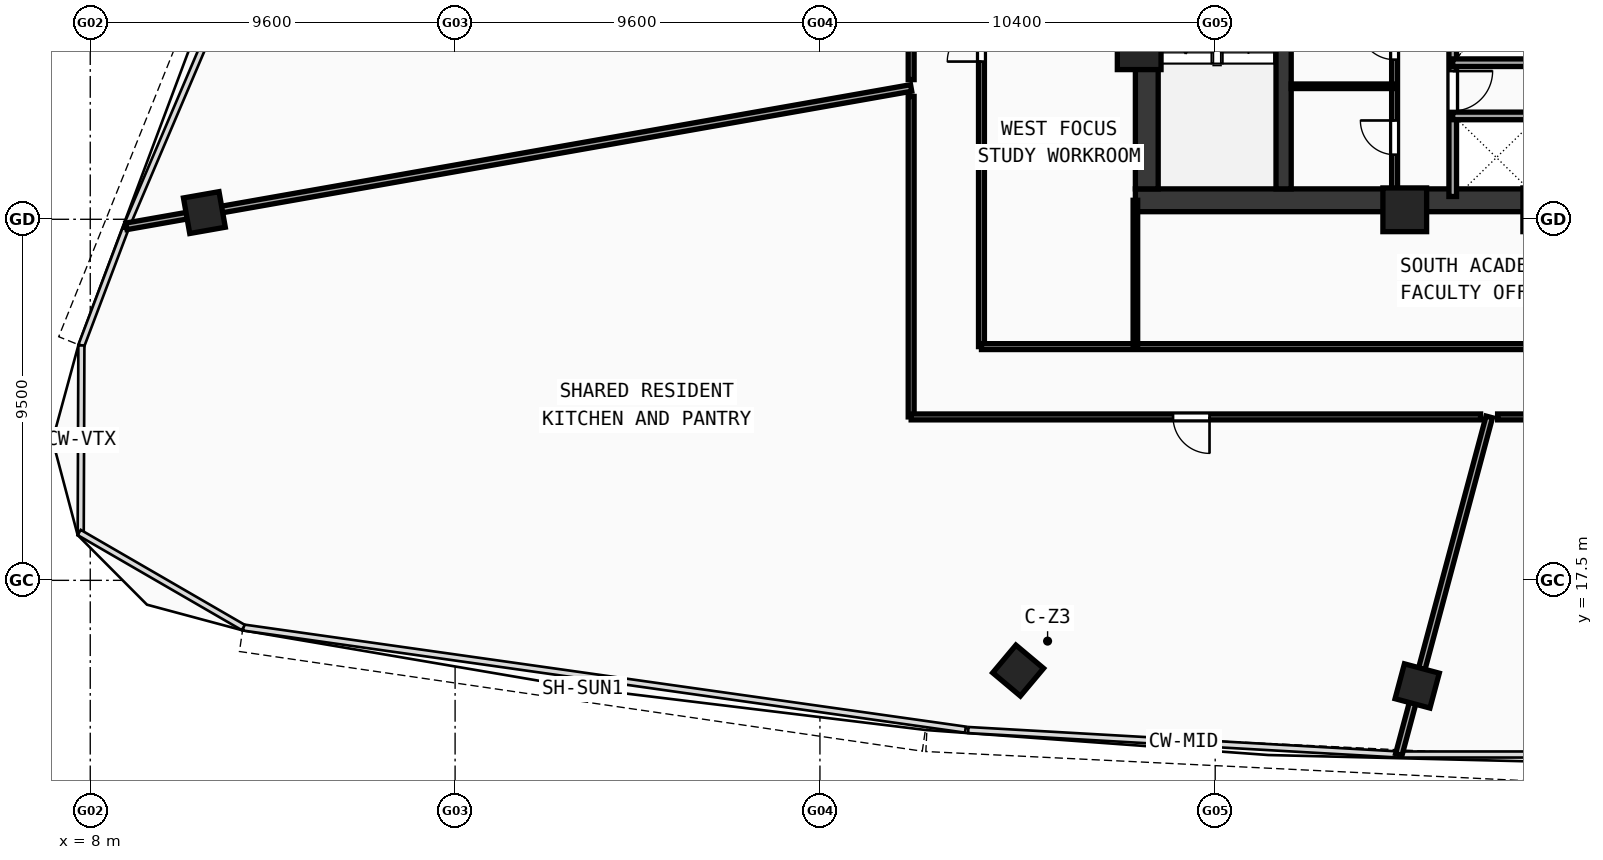
"""IFC4 building model, lengths in metres.
Left out: names, types, materials, properties, quantities, classifications, styles, units other than length and angle.
Written with IfcOpenShell. Run it as: python <this file> out.ifc"""

import sys

from ifc_helpers import new_model, si_unit, direction, frame, frame_2d, origin, origin_with_axes, origin_2d, place, context, subcontext, project, spatial, rectangle, hollow_rectangle, extrude, source, transform, mapped, element, fill, save


model = new_model("IFC4")
c1 = context("Model", 3, precision=1e-05, world=origin(), true_north=direction((0.0, 1.0)))
c2 = subcontext(c1, "Body", "Model", "MODEL_VIEW")
j1 = project(units=[si_unit("LENGTHUNIT", "METRE"), si_unit("PLANEANGLEUNIT", "RADIAN")], contexts=[c1])
p1 = place(None, origin())
s1 = spatial("IfcSite", under=j1, at=p1, CompositionType="ELEMENT")
p2 = place(p1, origin())
s2 = spatial("IfcBuilding", under=s1, at=p2, CompositionType="ELEMENT")
p3 = place(p2, frame((0.0, 0.0, 129.83)))
s3 = spatial("IfcBuildingStorey", under=s2, at=p3, CompositionType="ELEMENT", Elevation=129.83)
p4 = place(p3, frame((35.5, 27.5, 0.0), z_axis=(0.0, 0.0, 1.0), x_axis=(1.0, 0.0, 0.0)))
e1 = element("IfcWall", 1, at=p4, inside=s3, PredefinedType="SHEAR", context=c2, shape_type="SweptSolid", body=[
    extrude(rectangle(XDim=25.0, YDim=0.6, at=frame_2d((12.5, 0.0))), origin(), (0.0, 0.0, 1.0), 3.42),
])
p5 = place(p3, frame((35.8, 27.8, 0.0), z_axis=(0.0, 0.0, 1.0), x_axis=(0.0, 1.0, 0.0)))
e2 = element("IfcWall", 2, at=p5, inside=s3, PredefinedType="SHEAR", context=c2, shape_type="SweptSolid", body=[
    extrude(rectangle(XDim=12.1, YDim=0.6, at=frame_2d((6.05, 0.0))), origin(), (0.0, 0.0, 1.0), 3.42),
])
p6 = place(p3, frame((39.4, 27.8, 0.0), z_axis=(0.0, 0.0, 1.0), x_axis=(0.0, 1.0, 0.0)))
e3 = element("IfcWall", 3, at=p6, inside=s3, PredefinedType="SHEAR", context=c2, shape_type="SweptSolid", body=[
    extrude(rectangle(XDim=12.1, YDim=0.4, at=frame_2d((6.05, 0.0))), origin(), (0.0, 0.0, 1.0), 3.42),
])
p7 = place(p6, frame((9.95, 0.0, 0.0)))
e4 = element("IfcOpeningElement", 4, at=p7, cuts=e3, PredefinedType="OPENING", context=c2, shape_type="SweptSolid", body=[
    extrude(rectangle(XDim=1.1, YDim=2.1, at=frame_2d((0.55, 1.05))), frame((0.0, 0.21, 0.0), z_axis=(0.0, -1.0, 0.0), x_axis=(1.0, 0.0, 0.0)), (0.0, 0.0, 1.0), 0.42),
])
m1 = source(origin(), c2, "Body", "SweptSolid", [
    extrude(hollow_rectangle(XDim=1.15, YDim=1.15, WallThickness=0.048, at=origin_2d()), origin(), (0.0, 0.0, 1.0), 3.68),
])
for number, where, z_axis, x_axis in (
    (5, (42.588, 27.25, -0.26), (0.0, 0.0, 1.0), (1.0, 0.0, 0.0)),
    (6, (46.272, 27.25, -0.26), (0.0, 0.0, 1.0), (1.0, 0.0, 0.0)),
    (7, (35.6, 31.513, -0.26), (0.0, 0.0, 1.0), (1.0, 0.0, 0.0)),
):
    element("IfcColumn", number, at=place(p3, frame(where, z_axis=z_axis, x_axis=x_axis)), inside=s3, PredefinedType="COLUMN", context=c2, shape_type="MappedRepresentation", body=[
        mapped(m1, transform((0.0, 0.0, 0.0), scale=1.0)),
    ])
m2 = source(origin(), c2, "Body", "SweptSolid", [
    extrude(hollow_rectangle(XDim=0.95, YDim=0.95, WallThickness=0.04, at=origin_2d()), origin(), (0.0, 0.0, 1.0), 3.68),
])
for number, where, z_axis, x_axis in (
    (8, (32.415, 15.126, -0.26), (0.0, 0.0, 1.0), (0.766, -0.643, 0.0)),
    (9, (42.915, 14.722, -0.26), (0.0, 0.0, 1.0), (0.966, -0.259, 0.0)),
    (10, (11.003, 27.177, -0.26), (0.0, 0.0, 1.0), (0.174, -0.985, 0.0)),
):
    element("IfcColumn", number, at=place(p3, frame(where, z_axis=z_axis, x_axis=x_axis)), inside=s3, PredefinedType="COLUMN", context=c2, shape_type="MappedRepresentation", body=[
        mapped(m2, transform((0.0, 0.0, 0.0), scale=1.0)),
    ])
p8 = place(p3, frame((43.85, 27.6, 0.0), z_axis=(0.0, 0.0, 1.0), x_axis=(0.0, 1.0, 0.0)))
e11 = element("IfcWall", 11, at=p8, inside=s3, PredefinedType="SOLIDWALL", context=c2, shape_type="SweptSolid", body=[
    extrude(rectangle(XDim=6.22, YDim=0.2, at=frame_2d((3.11, 0.0))), origin(), (0.0, 0.0, 1.0), 3.42),
])
p9 = place(p8, frame((2.25, 0.0, 0.0)))
e12 = element("IfcOpeningElement", 12, at=p9, cuts=e11, PredefinedType="OPENING", context=c2, shape_type="SweptSolid", body=[
    extrude(rectangle(XDim=1.05, YDim=2.1, at=frame_2d((0.525, 1.05))), frame((0.0, 0.11, 0.0), z_axis=(0.0, -1.0, 0.0), x_axis=(1.0, 0.0, 0.0)), (0.0, 0.0, 1.0), 0.22),
])
p10 = place(p3, frame((43.85, 29.72, 0.0), z_axis=(0.0, 0.0, 1.0), x_axis=(1.0, 0.0, 0.0)))
e13 = element("IfcWall", 13, at=p10, inside=s3, PredefinedType="SOLIDWALL", context=c2, shape_type="SweptSolid", body=[
    extrude(rectangle(XDim=7.2, YDim=0.2, at=frame_2d((3.6, 0.0))), origin(), (0.0, 0.0, 1.0), 3.42),
])
p11 = place(p3, frame((43.85, 31.12, 0.0), z_axis=(0.0, 0.0, 1.0), x_axis=(1.0, 0.0, 0.0)))
e14 = element("IfcWall", 14, at=p11, inside=s3, PredefinedType="SOLIDWALL", context=c2, shape_type="SweptSolid", body=[
    extrude(rectangle(XDim=9.83, YDim=0.2, at=frame_2d((4.915, 0.0))), origin(), (0.0, 0.0, 1.0), 3.42),
])
p12 = place(p3, frame((42.32, 27.6, 0.0), z_axis=(0.0, 0.0, 1.0), x_axis=(0.0, 1.0, 0.0)))
e15 = element("IfcWall", 15, at=p12, inside=s3, PredefinedType="PARTITIONING", context=c2, shape_type="SweptSolid", body=[
    extrude(rectangle(XDim=5.9, YDim=0.155, at=frame_2d((2.95, 0.0))), origin(), (0.0, 0.0, 1.0), 3.42),
])
p13 = place(p12, frame((1.1, 0.0, 0.0)))
e16 = element("IfcOpeningElement", 16, at=p13, cuts=e15, PredefinedType="OPENING", context=c2, shape_type="SweptSolid", body=[
    extrude(rectangle(XDim=0.9, YDim=2.1, at=frame_2d((0.45, 1.05))), frame((0.0, 0.087, 0.0), z_axis=(0.0, -1.0, 0.0), x_axis=(1.0, 0.0, 0.0)), (0.0, 0.0, 1.0), 0.175),
])
p14 = place(p12, frame((3.6, 0.0, 0.0)))
e17 = element("IfcOpeningElement", 17, at=p14, cuts=e15, PredefinedType="OPENING", context=c2, shape_type="SweptSolid", body=[
    extrude(rectangle(XDim=0.94, YDim=2.1, at=frame_2d((0.47, 1.05))), frame((0.0, 0.087, 0.0), z_axis=(0.0, -1.0, 0.0), x_axis=(1.0, 0.0, 0.0)), (0.0, 0.0, 1.0), 0.175),
])
p15 = place(p3, frame((39.6, 30.5, 0.0), z_axis=(0.0, 0.0, 1.0), x_axis=(1.0, 0.0, 0.0)))
e18 = element("IfcWall", 18, at=p15, inside=s3, PredefinedType="PARTITIONING", context=c2, shape_type="SweptSolid", body=[
    extrude(rectangle(XDim=2.72, YDim=0.12, at=frame_2d((1.36, 0.0))), origin(), (0.0, 0.0, 1.0), 3.42),
])
p16 = place(p3, frame((31.45, 23.65, 0.0), z_axis=(0.0, 0.0, 1.0), x_axis=(0.0, 1.0, 0.0)))
e19 = element("IfcWall", 19, at=p16, inside=s3, PredefinedType="PARTITIONING", context=c2, shape_type="SweptSolid", body=[
    extrude(rectangle(XDim=16.6, YDim=0.155, at=frame_2d((8.3, 0.0))), origin(), (0.0, 0.0, 1.0), 2.77),
])
p17 = place(p16, frame((7.5, 0.0, 0.0)))
e20 = element("IfcOpeningElement", 20, at=p17, cuts=e19, PredefinedType="OPENING", context=c2, shape_type="SweptSolid", body=[
    extrude(rectangle(XDim=0.9, YDim=2.08, at=frame_2d((0.45, 1.04))), frame((0.0, 0.087, 0.0), z_axis=(0.0, -1.0, 0.0), x_axis=(1.0, 0.0, 0.0)), (0.0, 0.0, 1.0), 0.175),
])
p18 = place(p3, frame((31.45, 23.65, 0.0), z_axis=(0.0, 0.0, 1.0), x_axis=(1.0, 0.0, 0.0)))
e21 = element("IfcWall", 21, at=p18, inside=s3, PredefinedType="PARTITIONING", context=c2, shape_type="SweptSolid", body=[
    extrude(rectangle(XDim=33.1, YDim=0.155, at=frame_2d((16.55, 0.0))), origin(), (0.0, 0.0, 1.0), 2.77),
])
p19 = place(p18, frame((16.0, 0.0, 0.0)))
e22 = element("IfcOpeningElement", 22, at=p19, cuts=e21, PredefinedType="OPENING", context=c2, shape_type="SweptSolid", body=[
    extrude(rectangle(XDim=0.92, YDim=2.1, at=frame_2d((0.46, 1.05))), frame((0.0, 0.087, 0.0), z_axis=(0.0, -1.0, 0.0), x_axis=(1.0, 0.0, 0.0)), (0.0, 0.0, 1.0), 0.175),
])
p20 = place(p3, frame((35.5, 23.65, 0.0), z_axis=(0.0, 0.0, 1.0), x_axis=(0.0, 1.0, 0.0)))
e23 = element("IfcWall", 23, at=p20, inside=s3, PredefinedType="PARTITIONING", context=c2, shape_type="SweptSolid", body=[
    extrude(rectangle(XDim=3.85, YDim=0.12, at=frame_2d((1.925, 0.0))), origin(), (0.0, 0.0, 1.0), 3.02),
])
p21 = place(p3, frame((29.6, 30.456, 0.0), z_axis=(0.0, 0.0, 1.0), x_axis=(-0.98480711194, -0.173651813328, 0.0)))
e24 = element("IfcWall", 24, at=p21, inside=s3, PredefinedType="PARTITIONING", context=c2, shape_type="SweptSolid", body=[
    extrude(rectangle(XDim=20.967, YDim=0.175, at=frame_2d((10.483, 0.0))), origin(), (0.0, 0.0, 1.0), 2.77),
])
p22 = place(p3, frame((44.811, 21.8, 0.0), z_axis=(0.0, 0.0, 1.0), x_axis=(-0.258799340884, -0.965931105803, 0.0)))
e25 = element("IfcWall", 25, at=p22, inside=s3, PredefinedType="PARTITIONING", context=c2, shape_type="SweptSolid", body=[
    extrude(rectangle(XDim=9.196, YDim=0.175, at=frame_2d((4.598, 0.0))), origin(), (0.0, 0.0, 1.0), 2.77),
])
p23 = place(p3, frame((29.6, 21.8, 0.0), z_axis=(0.0, 0.0, 1.0), x_axis=(0.0, 1.0, 0.0)))
e26 = element("IfcWall", 26, at=p23, inside=s3, PredefinedType="PARTITIONING", context=c2, shape_type="SweptSolid", body=[
    extrude(rectangle(XDim=8.432, YDim=0.155, at=frame_2d((4.216, 0.0))), origin(), (0.0, 0.0, 1.0), 3.02),
])
p24 = place(p3, frame((29.6, 30.675, 0.0), z_axis=(0.0, 0.0, 1.0), x_axis=(0.0, 1.0, 0.0)))
e27 = element("IfcWall", 27, at=p24, inside=s3, PredefinedType="PARTITIONING", context=c2, shape_type="SweptSolid", body=[
    extrude(rectangle(XDim=8.783, YDim=0.155, at=frame_2d((4.392, 0.0))), origin(), (0.0, 0.0, 1.0), 3.42),
])
p25 = place(p24, frame((3.917, 0.0, 0.0)))
e28 = element("IfcOpeningElement", 28, at=p25, cuts=e27, PredefinedType="OPENING", context=c2, shape_type="SweptSolid", body=[
    extrude(rectangle(XDim=0.96, YDim=2.12, at=frame_2d((0.48, 1.06))), frame((0.0, 0.087, 0.0), z_axis=(0.0, -1.0, 0.0), x_axis=(1.0, 0.0, 0.0)), (0.0, 0.0, 1.0), 0.175),
])
p26 = place(p3, frame((47.364, 21.8, 0.0), z_axis=(0.0, 0.0, 1.0), x_axis=(-1.0, 0.0, 0.0)))
e29 = element("IfcWall", 29, at=p26, inside=s3, PredefinedType="PARTITIONING", context=c2, shape_type="SweptSolid", body=[
    extrude(rectangle(XDim=2.333, YDim=0.155, at=frame_2d((1.167, 0.0))), origin(), (0.0, 0.0, 1.0), 3.42),
])
p27 = place(p26, frame((0.706, 0.0, 0.0)))
e30 = element("IfcOpeningElement", 30, at=p27, cuts=e29, PredefinedType="OPENING", context=c2, shape_type="SweptSolid", body=[
    extrude(rectangle(XDim=0.92, YDim=2.1, at=frame_2d((0.46, 1.05))), frame((0.0, 0.087, 0.0), z_axis=(0.0, -1.0, 0.0), x_axis=(1.0, 0.0, 0.0)), (0.0, 0.0, 1.0), 0.175),
])
p28 = place(p3, frame((44.583, 21.8, 0.0), z_axis=(0.0, 0.0, 1.0), x_axis=(-1.0, 0.0, 0.0)))
e31 = element("IfcWall", 31, at=p28, inside=s3, PredefinedType="PARTITIONING", context=c2, shape_type="SweptSolid", body=[
    extrude(rectangle(XDim=14.983, YDim=0.155, at=frame_2d((7.492, 0.0))), origin(), (0.0, 0.0, 1.0), 2.77),
])
p29 = place(p28, frame((7.133, 0.0, 0.0)))
e32 = element("IfcOpeningElement", 32, at=p29, cuts=e31, PredefinedType="OPENING", context=c2, shape_type="SweptSolid", body=[
    extrude(rectangle(XDim=0.96, YDim=2.12, at=frame_2d((0.48, 1.06))), frame((0.0, 0.087, 0.0), z_axis=(0.0, -1.0, 0.0), x_axis=(1.0, 0.0, 0.0)), (0.0, 0.0, 1.0), 0.175),
])
m3 = source(origin(), c2, "Body", "SweptSolid", [
    extrude(rectangle(XDim=1.05, YDim=2.1, at=frame_2d((0.525, 1.05))), frame((0.0, 0.025, 0.0), z_axis=(0.0, -1.0, 0.0), x_axis=(1.0, 0.0, 0.0)), (0.0, 0.0, 1.0), 0.05),
])
p30 = place(p9, frame((1.05, 0.0, 0.0), z_axis=(0.0, 0.0, 1.0), x_axis=(-1.0, 0.0, 0.0)))
e33 = element("IfcDoor", 33, at=p30, inside=s3, OperationType="SINGLE_SWING_LEFT", PredefinedType="DOOR", context=c2, shape_type="MappedRepresentation", body=[
    mapped(m3, transform((0.0, 0.0, 0.0), scale=1.0)),
])
fill(e12, e33)
m4 = source(origin(), c2, "Body", "SweptSolid", [
    extrude(rectangle(XDim=0.9, YDim=2.1, at=frame_2d((0.45, 1.05))), frame((0.0, 0.025, 0.0), z_axis=(0.0, -1.0, 0.0), x_axis=(1.0, 0.0, 0.0)), (0.0, 0.0, 1.0), 0.05),
])
p31 = place(p13, origin_with_axes())
e34 = element("IfcDoor", 34, at=p31, inside=s3, OperationType="SINGLE_SWING_RIGHT", PredefinedType="DOOR", context=c2, shape_type="MappedRepresentation", body=[
    mapped(m4, transform((0.0, 0.0, 0.0), scale=1.0)),
])
fill(e16, e34)
m5 = source(origin(), c2, "Body", "SweptSolid", [
    extrude(rectangle(XDim=0.94, YDim=2.1, at=frame_2d((0.47, 1.05))), frame((0.0, 0.025, 0.0), z_axis=(0.0, -1.0, 0.0), x_axis=(1.0, 0.0, 0.0)), (0.0, 0.0, 1.0), 0.05),
])
p32 = place(p14, origin_with_axes())
e35 = element("IfcDoor", 35, at=p32, inside=s3, OperationType="SINGLE_SWING_RIGHT", PredefinedType="DOOR", context=c2, shape_type="MappedRepresentation", body=[
    mapped(m5, transform((0.0, 0.0, 0.0), scale=1.0)),
])
fill(e17, e35)
m6 = source(origin(), c2, "Body", "SweptSolid", [
    extrude(rectangle(XDim=0.9, YDim=2.08, at=frame_2d((0.45, 1.04))), frame((0.0, 0.025, 0.0), z_axis=(0.0, -1.0, 0.0), x_axis=(1.0, 0.0, 0.0)), (0.0, 0.0, 1.0), 0.05),
])
p33 = place(p17, origin_with_axes())
e36 = element("IfcDoor", 36, at=p33, inside=s3, OperationType="SINGLE_SWING_LEFT", PredefinedType="DOOR", context=c2, shape_type="MappedRepresentation", body=[
    mapped(m6, transform((0.0, 0.0, 0.0), scale=1.0)),
])
fill(e20, e36)
m7 = source(origin(), c2, "Body", "SweptSolid", [
    extrude(rectangle(XDim=0.96, YDim=2.12, at=frame_2d((0.48, 1.06))), frame((0.0, 0.025, 0.0), z_axis=(0.0, -1.0, 0.0), x_axis=(1.0, 0.0, 0.0)), (0.0, 0.0, 1.0), 0.05),
])
p34 = place(p29, origin_with_axes())
e37 = element("IfcDoor", 37, at=p34, inside=s3, OperationType="SINGLE_SWING_LEFT", PredefinedType="DOOR", context=c2, shape_type="MappedRepresentation", body=[
    mapped(m7, transform((0.0, 0.0, 0.0), scale=1.0)),
])
fill(e32, e37)
save(model, sys.argv[1])
